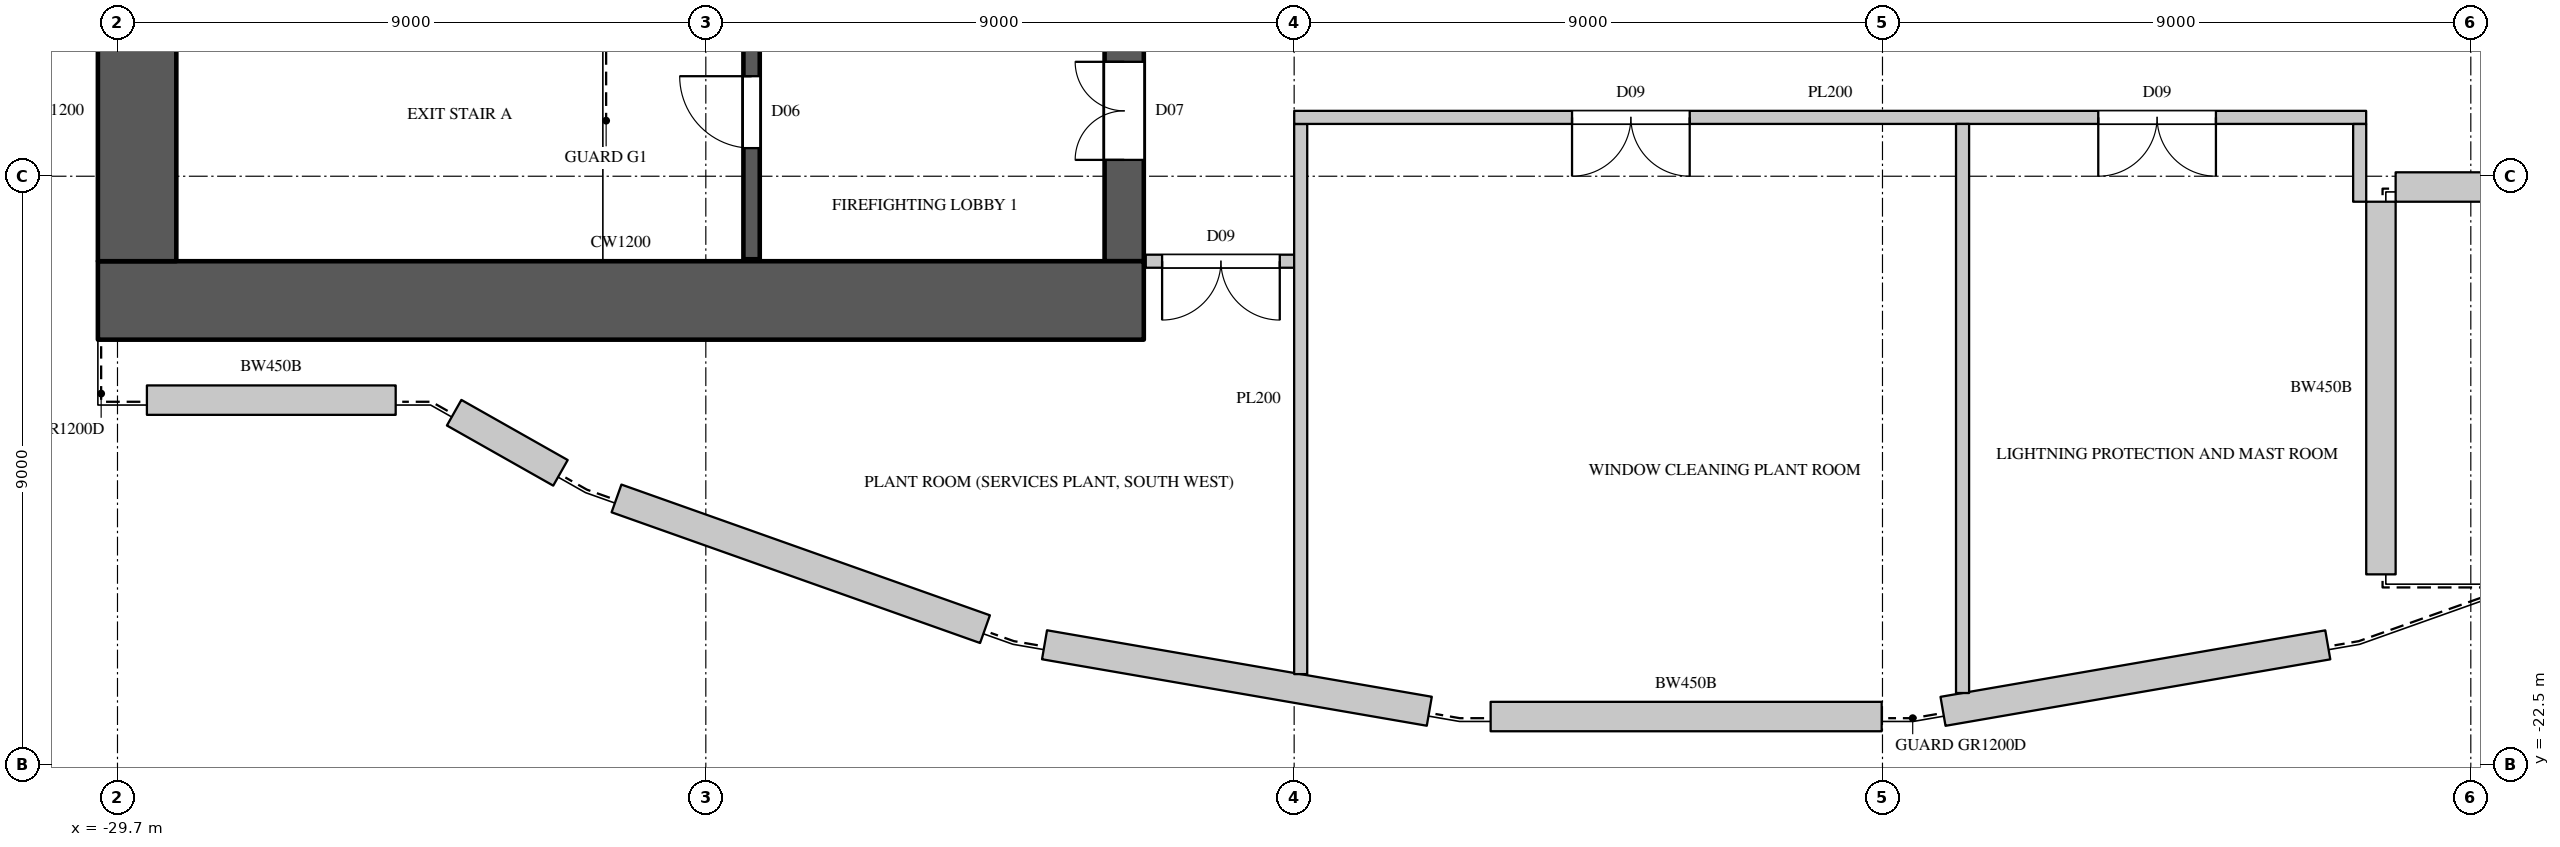
"""IFC4 building model, lengths in metres.
Left out: names, types, materials, properties, quantities, classifications, styles, units other than length and angle.
Written with IfcOpenShell. Run it as: python <this file> out.ifc"""

import sys

from ifc_helpers import new_model, si_unit, direction, frame, frame_2d, origin, place, context, subcontext, project, spatial, rectangle, extrude, element, fill, save


model = new_model("IFC4")
c1 = context("Model", 3, precision=1e-05, world=origin(), true_north=direction((0.0, 1.0)))
c2 = subcontext(c1, "Body", "Model", "MODEL_VIEW")
j1 = project(units=[si_unit("LENGTHUNIT", "METRE"), si_unit("PLANEANGLEUNIT", "RADIAN")], contexts=[c1])
p1 = place(None, origin())
s1 = spatial("IfcSite", under=j1, at=p1, CompositionType="ELEMENT")
p2 = place(p1, origin())
s2 = spatial("IfcBuilding", under=s1, at=p2, CompositionType="ELEMENT")
p3 = place(p2, frame((0.0, 0.0, 355.0)))
s3 = spatial("IfcBuildingStorey", under=s2, at=p3, CompositionType="ELEMENT", Elevation=355.0)
p4 = place(p3, frame((-29.25, -16.925, 0.0), z_axis=(0.0, 0.0, 1.0), x_axis=(1.0, 0.0, 0.0)))
e1 = element("IfcWall", 1, at=p4, inside=s3, PredefinedType="SOLIDWALL", context=c2, shape_type="SweptSolid", body=[
    extrude(rectangle(XDim=3.806, YDim=0.45, at=frame_2d((1.903, 0.0))), origin(), (0.0, 0.0, 1.0), 4.0),
])
p5 = place(p3, frame((-24.55, -17.117, 0.0), z_axis=(0.0, 0.0, 1.0), x_axis=(0.8704776513, -0.492207942427, 0.0)))
e2 = element("IfcWall", 2, at=p5, inside=s3, PredefinedType="SOLIDWALL", context=c2, shape_type="SweptSolid", body=[
    extrude(rectangle(XDim=1.868, YDim=0.45, at=frame_2d((0.934, 0.0))), origin(), (0.0, 0.0, 1.0), 4.0),
])
p6 = place(p3, frame((-22.066, -18.428, 0.0), z_axis=(0.0, 0.0, 1.0), x_axis=(0.942451811453, -0.334342015142, 0.0)))
e3 = element("IfcWall", 3, at=p6, inside=s3, PredefinedType="SOLIDWALL", context=c2, shape_type="SweptSolid", body=[
    extrude(rectangle(XDim=5.981, YDim=0.45, at=frame_2d((2.991, 0.0))), origin(), (0.0, 0.0, 1.0), 4.0),
])
p7 = place(p3, frame((-15.519, -20.667, 0.0), z_axis=(0.0, 0.0, 1.0), x_axis=(0.985396567064, -0.170275088074, 0.0)))
e4 = element("IfcWall", 4, at=p7, inside=s3, PredefinedType="SOLIDWALL", context=c2, shape_type="SweptSolid", body=[
    extrude(rectangle(XDim=5.973, YDim=0.45, at=frame_2d((2.987, 0.0))), origin(), (0.0, 0.0, 1.0), 4.0),
])
p8 = place(p3, frame((-8.694, -21.765, 0.0), z_axis=(0.0, 0.0, 1.0), x_axis=(1.0, 0.0, 0.0)))
e5 = element("IfcWall", 5, at=p8, inside=s3, PredefinedType="SOLIDWALL", context=c2, shape_type="SweptSolid", body=[
    extrude(rectangle(XDim=5.982, YDim=0.45, at=frame_2d((2.991, 0.0))), origin(), (0.0, 0.0, 1.0), 4.0),
])
p9 = place(p3, frame((-1.774, -21.685, 0.0), z_axis=(0.0, 0.0, 1.0), x_axis=(0.985403424257, 0.170235400142, 0.0)))
e6 = element("IfcWall", 6, at=p9, inside=s3, PredefinedType="SOLIDWALL", context=c2, shape_type="SweptSolid", body=[
    extrude(rectangle(XDim=5.973, YDim=0.45, at=frame_2d((2.987, 0.0))), origin(), (0.0, 0.0, 1.0), 4.0),
])
p10 = place(p3, frame((4.925, -19.59, 0.0), z_axis=(0.0, 0.0, 1.0), x_axis=(0.0, 1.0, 0.0)))
e7 = element("IfcWall", 7, at=p10, inside=s3, PredefinedType="SOLIDWALL", context=c2, shape_type="SweptSolid", body=[
    extrude(rectangle(XDim=5.7, YDim=0.45, at=frame_2d((2.85, 0.0))), origin(), (0.0, 0.0, 1.0), 4.0),
])
p11 = place(p3, frame((5.15, -13.665, 0.0), z_axis=(0.0, 0.0, 1.0), x_axis=(1.0, 0.0, 0.0)))
e8 = element("IfcWall", 8, at=p11, inside=s3, PredefinedType="SOLIDWALL", context=c2, shape_type="SweptSolid", body=[
    extrude(rectangle(XDim=4.1, YDim=0.45, at=frame_2d((2.05, 0.0))), origin(), (0.0, 0.0, 1.0), 4.0),
])
p12 = place(p3, frame((-30.0, -15.4, 0.0), z_axis=(0.0, 0.0, 1.0), x_axis=(1.0, 0.0, 0.0)))
e9 = element("IfcWall", 9, at=p12, inside=s3, PredefinedType="SHEAR", context=c2, shape_type="SweptSolid", body=[
    extrude(rectangle(XDim=16.0, YDim=1.2, at=frame_2d((8.0, 0.0))), origin(), (0.0, 0.0, 1.0), 4.0),
])
p13 = place(p3, frame((-14.3, -14.8, 0.0), z_axis=(0.0, 0.0, 1.0), x_axis=(0.0, 1.0, 0.0)))
e10 = element("IfcWall", 10, at=p13, inside=s3, PredefinedType="SHEAR", context=c2, shape_type="SweptSolid", body=[
    extrude(rectangle(XDim=29.6, YDim=0.6, at=frame_2d((14.8, 0.0))), origin(), (0.0, 0.0, 1.0), 4.0),
])
p14 = place(p13, frame((1.55, 0.0, 0.0)))
e11 = element("IfcOpeningElement", 11, at=p14, cuts=e10, PredefinedType="OPENING", context=c2, shape_type="SweptSolid", body=[
    extrude(rectangle(XDim=1.5, YDim=2.4, at=frame_2d((0.75, 1.2))), frame((0.0, 0.31, 0.0), z_axis=(0.0, -1.0, 0.0), x_axis=(1.0, 0.0, 0.0)), (0.0, 0.0, 1.0), 0.62),
])
p15 = place(p13, frame((26.55, 0.0, 0.0)))
e12 = element("IfcOpeningElement", 12, at=p15, cuts=e10, PredefinedType="OPENING", context=c2, shape_type="SweptSolid", body=[
    extrude(rectangle(XDim=1.5, YDim=2.4, at=frame_2d((0.75, 1.2))), frame((0.0, 0.31, 0.0), z_axis=(0.0, -1.0, 0.0), x_axis=(1.0, 0.0, 0.0)), (0.0, 0.0, 1.0), 0.62),
])
p16 = place(p13, frame((8.45, 0.0, 0.0)))
e13 = element("IfcOpeningElement", 13, at=p16, cuts=e10, PredefinedType="OPENING", context=c2, shape_type="SweptSolid", body=[
    extrude(rectangle(XDim=1.5, YDim=2.4, at=frame_2d((0.75, 1.2))), frame((0.0, 0.31, 0.0), z_axis=(0.0, -1.0, 0.0), x_axis=(1.0, 0.0, 0.0)), (0.0, 0.0, 1.0), 0.62),
])
p17 = place(p13, frame((19.65, 0.0, 0.0)))
e14 = element("IfcOpeningElement", 14, at=p17, cuts=e10, PredefinedType="OPENING", context=c2, shape_type="SweptSolid", body=[
    extrude(rectangle(XDim=1.5, YDim=2.4, at=frame_2d((0.75, 1.2))), frame((0.0, 0.31, 0.0), z_axis=(0.0, -1.0, 0.0), x_axis=(1.0, 0.0, 0.0)), (0.0, 0.0, 1.0), 0.62),
])
p18 = place(p13, frame((14.5, 0.0, 0.0)))
e15 = element("IfcOpeningElement", 15, at=p18, cuts=e10, PredefinedType="OPENING", context=c2, shape_type="SweptSolid", body=[
    extrude(rectangle(XDim=0.6, YDim=2.0, at=frame_2d((0.3, 1.0))), frame((0.0, 0.31, 0.0), z_axis=(0.0, -1.0, 0.0), x_axis=(1.0, 0.0, 0.0)), (0.0, 0.0, 1.0), 0.62),
])
p19 = place(p3, frame((-29.4, -14.8, 0.0), z_axis=(0.0, 0.0, 1.0), x_axis=(0.0, 1.0, 0.0)))
e16 = element("IfcWall", 16, at=p19, inside=s3, PredefinedType="SHEAR", context=c2, shape_type="SweptSolid", body=[
    extrude(rectangle(XDim=4.6, YDim=1.2, at=frame_2d((2.3, 0.0))), origin(), (0.0, 0.0, 1.0), 4.0),
])
p20 = place(p3, frame((-13.97, -14.8, 0.0), z_axis=(0.0, 0.0, 1.0), x_axis=(1.0, 0.0, 0.0)))
e17 = element("IfcWall", 17, at=p20, inside=s3, PredefinedType="PARTITIONING", context=c2, shape_type="SweptSolid", body=[
    extrude(rectangle(XDim=2.27, YDim=0.2, at=frame_2d((1.135, 0.0))), origin(), (0.0, 0.0, 1.0), 3.548),
])
p21 = place(p20, frame((0.25, 0.0, 0.0)))
e18 = element("IfcOpeningElement", 18, at=p21, cuts=e17, PredefinedType="OPENING", context=c2, shape_type="SweptSolid", body=[
    extrude(rectangle(XDim=1.8, YDim=2.4, at=frame_2d((0.9, 1.2))), frame((0.0, 0.11, 0.0), z_axis=(0.0, -1.0, 0.0), x_axis=(1.0, 0.0, 0.0)), (0.0, 0.0, 1.0), 0.22),
])
p22 = place(p3, frame((-11.6, -21.116, 0.0), z_axis=(0.0, 0.0, 1.0), x_axis=(0.0, 1.0, 0.0)))
e19 = element("IfcWall", 19, at=p22, inside=s3, PredefinedType="PARTITIONING", context=c2, shape_type="SweptSolid", body=[
    extrude(rectangle(XDim=8.415, YDim=0.2, at=frame_2d((4.208, 0.0))), origin(), (0.0, 0.0, 1.0), 3.548),
])
p23 = place(p3, frame((-11.699, -12.6, 0.0), z_axis=(0.0, 0.0, 1.0), x_axis=(1.0, 0.0, 0.0)))
e20 = element("IfcWall", 20, at=p23, inside=s3, PredefinedType="PARTITIONING", context=c2, shape_type="SweptSolid", body=[
    extrude(rectangle(XDim=16.398, YDim=0.2, at=frame_2d((8.199, 0.0))), origin(), (0.0, 0.0, 1.0), 3.548),
])
p24 = place(p23, frame((4.25, 0.0, 0.0)))
e21 = element("IfcOpeningElement", 21, at=p24, cuts=e20, PredefinedType="OPENING", context=c2, shape_type="SweptSolid", body=[
    extrude(rectangle(XDim=1.8, YDim=2.4, at=frame_2d((0.9, 1.2))), frame((0.0, 0.11, 0.0), z_axis=(0.0, -1.0, 0.0), x_axis=(1.0, 0.0, 0.0)), (0.0, 0.0, 1.0), 0.22),
])
p25 = place(p23, frame((12.3, 0.0, 0.0)))
e22 = element("IfcOpeningElement", 22, at=p25, cuts=e20, PredefinedType="OPENING", context=c2, shape_type="SweptSolid", body=[
    extrude(rectangle(XDim=1.8, YDim=2.4, at=frame_2d((0.9, 1.2))), frame((0.0, 0.11, 0.0), z_axis=(0.0, -1.0, 0.0), x_axis=(1.0, 0.0, 0.0)), (0.0, 0.0, 1.0), 0.22),
])
p26 = place(p3, frame((-1.475, -21.405, 0.0), z_axis=(0.0, 0.0, 1.0), x_axis=(0.0, 1.0, 0.0)))
e23 = element("IfcWall", 23, at=p26, inside=s3, PredefinedType="PARTITIONING", context=c2, shape_type="SweptSolid", body=[
    extrude(rectangle(XDim=8.705, YDim=0.2, at=frame_2d((4.353, 0.0))), origin(), (0.0, 0.0, 1.0), 3.548),
])
p27 = place(p3, frame((4.6, -13.89, 0.0), z_axis=(0.0, 0.0, 1.0), x_axis=(0.0, 1.0, 0.0)))
e24 = element("IfcWall", 24, at=p27, inside=s3, PredefinedType="PARTITIONING", context=c2, shape_type="SweptSolid", body=[
    extrude(rectangle(XDim=1.189, YDim=0.2, at=frame_2d((0.594, 0.0))), origin(), (0.0, 0.0, 1.0), 3.548),
])
p28 = place(p3, frame((-20.0, -14.77, 0.0), z_axis=(0.0, 0.0, 1.0), x_axis=(0.0, 1.0, 0.0)))
e25 = element("IfcWall", 25, at=p28, inside=s3, PredefinedType="SHEAR", context=c2, shape_type="SweptSolid", body=[
    extrude(rectangle(XDim=4.445, YDim=0.25, at=frame_2d((2.223, 0.0))), origin(), (0.0, 0.0, 1.0), 3.548),
])
p29 = place(p28, frame((1.7, 0.0, 0.0)))
e26 = element("IfcOpeningElement", 26, at=p29, cuts=e25, PredefinedType="OPENING", context=c2, shape_type="SweptSolid", body=[
    extrude(rectangle(XDim=1.1, YDim=2.2, at=frame_2d((0.55, 1.1))), frame((0.0, 0.135, 0.0), z_axis=(0.0, -1.0, 0.0), x_axis=(1.0, 0.0, 0.0)), (0.0, 0.0, 1.0), 0.27),
])
p30 = place(p29, origin())
e27 = element("IfcDoor", 27, at=p30, inside=s3, OperationType="SINGLE_SWING_RIGHT", PredefinedType="DOOR", context=c2, shape_type="SweptSolid", body=[
    extrude(rectangle(XDim=1.1, YDim=2.2, at=frame_2d((0.55, 1.1))), frame((0.0, 0.025, 0.0), z_axis=(0.0, -1.0, 0.0), x_axis=(1.0, 0.0, 0.0)), (0.0, 0.0, 1.0), 0.05),
])
fill(e26, e27)
p31 = place(p24, origin())
e28 = element("IfcDoor", 28, at=p31, inside=s3, OperationType="DOUBLE_DOOR_SINGLE_SWING", PredefinedType="DOOR", context=c2, shape_type="SweptSolid", body=[
    extrude(rectangle(XDim=1.8, YDim=2.4, at=frame_2d((0.9, 1.2))), frame((0.0, 0.025, 0.0), z_axis=(0.0, -1.0, 0.0), x_axis=(1.0, 0.0, 0.0)), (0.0, 0.0, 1.0), 0.05),
])
fill(e21, e28)
p32 = place(p25, origin())
e29 = element("IfcDoor", 29, at=p32, inside=s3, OperationType="DOUBLE_DOOR_SINGLE_SWING", PredefinedType="DOOR", context=c2, shape_type="SweptSolid", body=[
    extrude(rectangle(XDim=1.8, YDim=2.4, at=frame_2d((0.9, 1.2))), frame((0.0, 0.025, 0.0), z_axis=(0.0, -1.0, 0.0), x_axis=(1.0, 0.0, 0.0)), (0.0, 0.0, 1.0), 0.05),
])
fill(e22, e29)
p33 = place(p21, origin())
e30 = element("IfcDoor", 30, at=p33, inside=s3, OperationType="DOUBLE_DOOR_SINGLE_SWING", PredefinedType="DOOR", context=c2, shape_type="SweptSolid", body=[
    extrude(rectangle(XDim=1.8, YDim=2.4, at=frame_2d((0.9, 1.2))), frame((0.0, 0.025, 0.0), z_axis=(0.0, -1.0, 0.0), x_axis=(1.0, 0.0, 0.0)), (0.0, 0.0, 1.0), 0.05),
])
fill(e18, e30)
p34 = place(p14, origin())
e31 = element("IfcDoor", 31, at=p34, inside=s3, OperationType="DOUBLE_DOOR_SINGLE_SWING", PredefinedType="DOOR", context=c2, shape_type="SweptSolid", body=[
    extrude(rectangle(XDim=1.5, YDim=2.4, at=frame_2d((0.75, 1.2))), frame((0.0, 0.295, 0.0), z_axis=(0.0, -1.0, 0.0), x_axis=(1.0, 0.0, 0.0)), (0.0, 0.0, 1.0), 0.05),
])
fill(e11, e31)
save(model, sys.argv[1])
